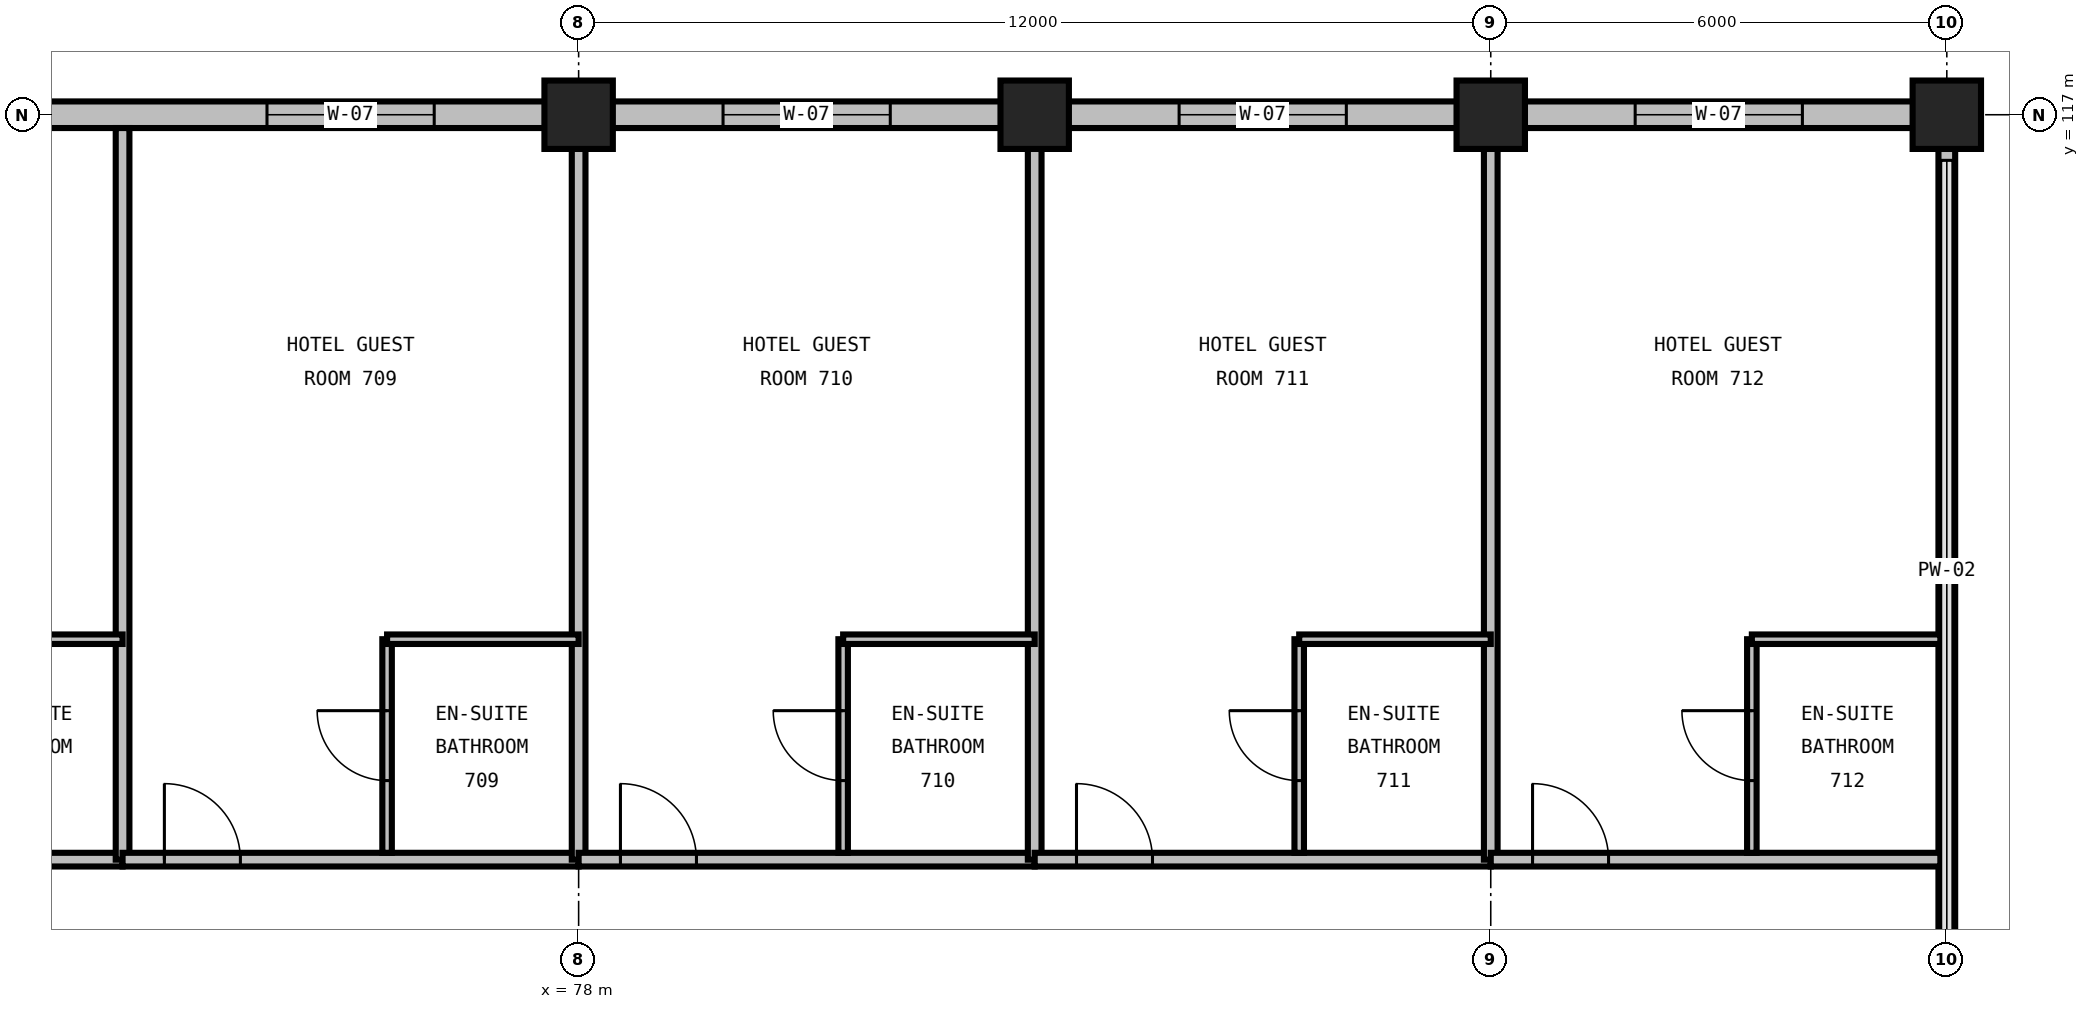
"""IFC4 building model, lengths in metres.
Left out: names, types, materials, properties, quantities, classifications, styles, units other than length and angle.
Written with IfcOpenShell. Run it as: python <this file> out.ifc"""

import sys

from ifc_helpers import new_model, si_unit, direction, frame, frame_2d, origin, origin_2d, place, context, subcontext, project, spatial, rectangle, extrude, element, fill, save


model = new_model("IFC4")
c1 = context("Model", 3, precision=1e-05, world=origin(), true_north=direction((0.0, 1.0)))
c2 = subcontext(c1, "Body", "Model", "MODEL_VIEW")
j1 = project(units=[si_unit("LENGTHUNIT", "METRE"), si_unit("PLANEANGLEUNIT", "RADIAN")], contexts=[c1])
p1 = place(None, origin())
s1 = spatial("IfcSite", under=j1, at=p1, CompositionType="ELEMENT")
p2 = place(p1, origin())
s2 = spatial("IfcBuilding", under=s1, at=p2, CompositionType="ELEMENT")
p3 = place(p2, frame((0.0, 0.0, 34.8)))
s3 = spatial("IfcBuildingStorey", under=s2, at=p3, CompositionType="ELEMENT", Elevation=34.8)
for number, where, z_axis, x_axis in (
    (1, (78.0, 117.0, 0.0), (0.0, 0.0, 1.0), (1.0, 0.0, 0.0)),
    (2, (84.0, 117.0, 0.0), (0.0, 0.0, 1.0), (1.0, 0.0, 0.0)),
    (3, (90.0, 117.0, 0.0), (0.0, 0.0, 1.0), (1.0, 0.0, 0.0)),
    (4, (96.0, 117.0, 0.0), (0.0, 0.0, 1.0), (1.0, 0.0, 0.0)),
):
    element("IfcColumn", number, at=place(p3, frame(where, z_axis=z_axis, x_axis=x_axis)), inside=s3, PredefinedType="COLUMN", context=c2, shape_type="SweptSolid", body=[
        extrude(rectangle(XDim=0.9, YDim=0.9, at=origin_2d()), origin(), (0.0, 0.0, 1.0), 3.6),
    ])
p4 = place(p3, frame((78.0, 117.0, 0.0), z_axis=(0.0, 0.0, 1.0), x_axis=(-1.0, 0.0, 0.0)))
e5 = element("IfcWall", 5, at=p4, inside=s3, PredefinedType="STANDARD", context=c2, shape_type="SweptSolid", body=[
    extrude(rectangle(XDim=12.0, YDim=0.35, at=frame_2d((6.0, 0.0))), origin(), (0.0, 0.0, 1.0), 2.486),
])
p5 = place(p4, frame((1.9, 0.0, 0.75)))
e6 = element("IfcOpeningElement", 6, at=p5, cuts=e5, PredefinedType="OPENING", context=c2, shape_type="SweptSolid", body=[
    extrude(rectangle(XDim=2.2, YDim=1.6, at=frame_2d((1.1, 0.8))), frame((0.0, 0.19, 0.0), z_axis=(0.0, -1.0, 0.0), x_axis=(1.0, 0.0, 0.0)), (0.0, 0.0, 1.0), 0.38),
])
p6 = place(p4, frame((7.825, 0.0, 0.75)))
e7 = element("IfcOpeningElement", 7, at=p6, cuts=e5, PredefinedType="OPENING", context=c2, shape_type="SweptSolid", body=[
    extrude(rectangle(XDim=2.35, YDim=1.6, at=frame_2d((1.175, 0.8))), frame((0.0, 0.19, 0.0), z_axis=(0.0, -1.0, 0.0), x_axis=(1.0, 0.0, 0.0)), (0.0, 0.0, 1.0), 0.38),
])
p7 = place(p3, frame((84.0, 117.0, 0.0), z_axis=(0.0, 0.0, 1.0), x_axis=(-1.0, 0.0, 0.0)))
e8 = element("IfcWall", 8, at=p7, inside=s3, PredefinedType="STANDARD", context=c2, shape_type="SweptSolid", body=[
    extrude(rectangle(XDim=6.0, YDim=0.35, at=frame_2d((3.0, 0.0))), origin(), (0.0, 0.0, 1.0), 2.486),
])
p8 = place(p7, frame((1.9, 0.0, 0.75)))
e9 = element("IfcOpeningElement", 9, at=p8, cuts=e8, PredefinedType="OPENING", context=c2, shape_type="SweptSolid", body=[
    extrude(rectangle(XDim=2.2, YDim=1.6, at=frame_2d((1.1, 0.8))), frame((0.0, 0.19, 0.0), z_axis=(0.0, -1.0, 0.0), x_axis=(1.0, 0.0, 0.0)), (0.0, 0.0, 1.0), 0.38),
])
p9 = place(p3, frame((90.0, 117.0, 0.0), z_axis=(0.0, 0.0, 1.0), x_axis=(-1.0, 0.0, 0.0)))
e10 = element("IfcWall", 10, at=p9, inside=s3, PredefinedType="STANDARD", context=c2, shape_type="SweptSolid", body=[
    extrude(rectangle(XDim=6.0, YDim=0.35, at=frame_2d((3.0, 0.0))), origin(), (0.0, 0.0, 1.0), 2.486),
])
p10 = place(p9, frame((1.9, 0.0, 0.75)))
e11 = element("IfcOpeningElement", 11, at=p10, cuts=e10, PredefinedType="OPENING", context=c2, shape_type="SweptSolid", body=[
    extrude(rectangle(XDim=2.2, YDim=1.6, at=frame_2d((1.1, 0.8))), frame((0.0, 0.19, 0.0), z_axis=(0.0, -1.0, 0.0), x_axis=(1.0, 0.0, 0.0)), (0.0, 0.0, 1.0), 0.38),
])
p11 = place(p3, frame((96.0, 117.0, 0.0), z_axis=(0.0, 0.0, 1.0), x_axis=(-1.0, 0.0, 0.0)))
e12 = element("IfcWall", 12, at=p11, inside=s3, PredefinedType="STANDARD", context=c2, shape_type="SweptSolid", body=[
    extrude(rectangle(XDim=6.0, YDim=0.35, at=frame_2d((3.0, 0.0))), origin(), (0.0, 0.0, 1.0), 2.486),
])
p12 = place(p11, frame((1.9, 0.0, 0.75)))
e13 = element("IfcOpeningElement", 13, at=p12, cuts=e12, PredefinedType="OPENING", context=c2, shape_type="SweptSolid", body=[
    extrude(rectangle(XDim=2.2, YDim=1.6, at=frame_2d((1.1, 0.8))), frame((0.0, 0.19, 0.0), z_axis=(0.0, -1.0, 0.0), x_axis=(1.0, 0.0, 0.0)), (0.0, 0.0, 1.0), 0.38),
])
p13 = place(p3, frame((96.0, 105.0, 0.0), z_axis=(0.0, 0.0, 1.0), x_axis=(0.0, 1.0, 0.0)))
e14 = element("IfcWall", 14, at=p13, inside=s3, PredefinedType="PARAPET", context=c2, shape_type="SweptSolid", body=[
    extrude(rectangle(XDim=12.0, YDim=0.22, at=frame_2d((6.0, 0.0))), origin(), (0.0, 0.0, 1.0), 0.2),
])
p14 = place(p3, frame((66.0, 107.2, 0.0), z_axis=(0.0, 0.0, 1.0), x_axis=(1.0, 0.0, 0.0)))
e15 = element("IfcWall", 15, at=p14, inside=s3, PredefinedType="PARTITIONING", context=c2, shape_type="SweptSolid", body=[
    extrude(rectangle(XDim=6.0, YDim=0.18, at=frame_2d((3.0, 0.0))), origin(), (0.0, 0.0, 1.0), 3.29),
])
p15 = place(p14, frame((0.55, 0.0, 0.0)))
e16 = element("IfcOpeningElement", 16, at=p15, cuts=e15, PredefinedType="OPENING", context=c2, shape_type="SweptSolid", body=[
    extrude(rectangle(XDim=1.0, YDim=2.15, at=frame_2d((0.5, 1.075))), frame((0.0, 0.105, 0.0), z_axis=(0.0, -1.0, 0.0), x_axis=(1.0, 0.0, 0.0)), (0.0, 0.0, 1.0), 0.21),
])
p16 = place(p3, frame((72.0, 107.2, 0.0), z_axis=(0.0, 0.0, 1.0), x_axis=(0.0, 1.0, 0.0)))
e17 = element("IfcWall", 17, at=p16, inside=s3, PredefinedType="PARTITIONING", context=c2, shape_type="SweptSolid", body=[
    extrude(rectangle(XDim=9.625, YDim=0.18, at=frame_2d((4.812, 0.0))), origin(), (0.0, 0.0, 1.0), 3.29),
])
p17 = place(p3, frame((69.48, 110.1, 0.0), z_axis=(0.0, 0.0, 1.0), x_axis=(1.0, 0.0, 0.0)))
e18 = element("IfcWall", 18, at=p17, inside=s3, PredefinedType="PARTITIONING", context=c2, shape_type="SweptSolid", body=[
    extrude(rectangle(XDim=2.52, YDim=0.125, at=frame_2d((1.26, 0.0))), origin(), (0.0, 0.0, 1.0), 3.29),
])
p18 = place(p3, frame((72.0, 107.2, 0.0), z_axis=(0.0, 0.0, 1.0), x_axis=(1.0, 0.0, 0.0)))
e19 = element("IfcWall", 19, at=p18, inside=s3, PredefinedType="PARTITIONING", context=c2, shape_type="SweptSolid", body=[
    extrude(rectangle(XDim=6.0, YDim=0.18, at=frame_2d((3.0, 0.0))), origin(), (0.0, 0.0, 1.0), 3.29),
])
p19 = place(p18, frame((0.55, 0.0, 0.0)))
e20 = element("IfcOpeningElement", 20, at=p19, cuts=e19, PredefinedType="OPENING", context=c2, shape_type="SweptSolid", body=[
    extrude(rectangle(XDim=1.0, YDim=2.15, at=frame_2d((0.5, 1.075))), frame((0.0, 0.105, 0.0), z_axis=(0.0, -1.0, 0.0), x_axis=(1.0, 0.0, 0.0)), (0.0, 0.0, 1.0), 0.21),
])
p20 = place(p3, frame((78.0, 107.2, 0.0), z_axis=(0.0, 0.0, 1.0), x_axis=(0.0, 1.0, 0.0)))
e21 = element("IfcWall", 21, at=p20, inside=s3, PredefinedType="PARTITIONING", context=c2, shape_type="SweptSolid", body=[
    extrude(rectangle(XDim=9.625, YDim=0.18, at=frame_2d((4.812, 0.0))), origin(), (0.0, 0.0, 1.0), 2.59),
])
p21 = place(p3, frame((75.48, 107.29, 0.0), z_axis=(0.0, 0.0, 1.0), x_axis=(0.0, 1.0, 0.0)))
e22 = element("IfcWall", 22, at=p21, inside=s3, PredefinedType="PARTITIONING", context=c2, shape_type="SweptSolid", body=[
    extrude(rectangle(XDim=2.81, YDim=0.125, at=frame_2d((1.405, 0.0))), origin(), (0.0, 0.0, 1.0), 3.29),
])
p22 = place(p21, frame((0.95, 0.0, 0.0)))
e23 = element("IfcOpeningElement", 23, at=p22, cuts=e22, PredefinedType="OPENING", context=c2, shape_type="SweptSolid", body=[
    extrude(rectangle(XDim=0.92, YDim=2.1, at=frame_2d((0.46, 1.05))), frame((0.0, 0.077, 0.0), z_axis=(0.0, -1.0, 0.0), x_axis=(1.0, 0.0, 0.0)), (0.0, 0.0, 1.0), 0.155),
])
p23 = place(p3, frame((75.48, 110.1, 0.0), z_axis=(0.0, 0.0, 1.0), x_axis=(1.0, 0.0, 0.0)))
e24 = element("IfcWall", 24, at=p23, inside=s3, PredefinedType="PARTITIONING", context=c2, shape_type="SweptSolid", body=[
    extrude(rectangle(XDim=2.52, YDim=0.125, at=frame_2d((1.26, 0.0))), origin(), (0.0, 0.0, 1.0), 3.29),
])
p24 = place(p3, frame((78.0, 107.2, 0.0), z_axis=(0.0, 0.0, 1.0), x_axis=(1.0, 0.0, 0.0)))
e25 = element("IfcWall", 25, at=p24, inside=s3, PredefinedType="PARTITIONING", context=c2, shape_type="SweptSolid", body=[
    extrude(rectangle(XDim=6.0, YDim=0.18, at=frame_2d((3.0, 0.0))), origin(), (0.0, 0.0, 1.0), 3.29),
])
p25 = place(p24, frame((0.55, 0.0, 0.0)))
e26 = element("IfcOpeningElement", 26, at=p25, cuts=e25, PredefinedType="OPENING", context=c2, shape_type="SweptSolid", body=[
    extrude(rectangle(XDim=1.0, YDim=2.15, at=frame_2d((0.5, 1.075))), frame((0.0, 0.105, 0.0), z_axis=(0.0, -1.0, 0.0), x_axis=(1.0, 0.0, 0.0)), (0.0, 0.0, 1.0), 0.21),
])
p26 = place(p3, frame((84.0, 107.2, 0.0), z_axis=(0.0, 0.0, 1.0), x_axis=(0.0, 1.0, 0.0)))
e27 = element("IfcWall", 27, at=p26, inside=s3, PredefinedType="PARTITIONING", context=c2, shape_type="SweptSolid", body=[
    extrude(rectangle(XDim=9.625, YDim=0.18, at=frame_2d((4.812, 0.0))), origin(), (0.0, 0.0, 1.0), 2.59),
])
p27 = place(p3, frame((81.48, 107.29, 0.0), z_axis=(0.0, 0.0, 1.0), x_axis=(0.0, 1.0, 0.0)))
e28 = element("IfcWall", 28, at=p27, inside=s3, PredefinedType="PARTITIONING", context=c2, shape_type="SweptSolid", body=[
    extrude(rectangle(XDim=2.81, YDim=0.125, at=frame_2d((1.405, 0.0))), origin(), (0.0, 0.0, 1.0), 3.29),
])
p28 = place(p27, frame((0.95, 0.0, 0.0)))
e29 = element("IfcOpeningElement", 29, at=p28, cuts=e28, PredefinedType="OPENING", context=c2, shape_type="SweptSolid", body=[
    extrude(rectangle(XDim=0.92, YDim=2.1, at=frame_2d((0.46, 1.05))), frame((0.0, 0.077, 0.0), z_axis=(0.0, -1.0, 0.0), x_axis=(1.0, 0.0, 0.0)), (0.0, 0.0, 1.0), 0.155),
])
p29 = place(p3, frame((81.48, 110.1, 0.0), z_axis=(0.0, 0.0, 1.0), x_axis=(1.0, 0.0, 0.0)))
e30 = element("IfcWall", 30, at=p29, inside=s3, PredefinedType="PARTITIONING", context=c2, shape_type="SweptSolid", body=[
    extrude(rectangle(XDim=2.52, YDim=0.125, at=frame_2d((1.26, 0.0))), origin(), (0.0, 0.0, 1.0), 3.29),
])
p30 = place(p3, frame((84.0, 107.2, 0.0), z_axis=(0.0, 0.0, 1.0), x_axis=(1.0, 0.0, 0.0)))
e31 = element("IfcWall", 31, at=p30, inside=s3, PredefinedType="PARTITIONING", context=c2, shape_type="SweptSolid", body=[
    extrude(rectangle(XDim=6.0, YDim=0.18, at=frame_2d((3.0, 0.0))), origin(), (0.0, 0.0, 1.0), 3.29),
])
p31 = place(p30, frame((0.55, 0.0, 0.0)))
e32 = element("IfcOpeningElement", 32, at=p31, cuts=e31, PredefinedType="OPENING", context=c2, shape_type="SweptSolid", body=[
    extrude(rectangle(XDim=1.0, YDim=2.15, at=frame_2d((0.5, 1.075))), frame((0.0, 0.105, 0.0), z_axis=(0.0, -1.0, 0.0), x_axis=(1.0, 0.0, 0.0)), (0.0, 0.0, 1.0), 0.21),
])
p32 = place(p3, frame((90.0, 107.2, 0.0), z_axis=(0.0, 0.0, 1.0), x_axis=(0.0, 1.0, 0.0)))
e33 = element("IfcWall", 33, at=p32, inside=s3, PredefinedType="PARTITIONING", context=c2, shape_type="SweptSolid", body=[
    extrude(rectangle(XDim=9.625, YDim=0.18, at=frame_2d((4.812, 0.0))), origin(), (0.0, 0.0, 1.0), 2.59),
])
p33 = place(p3, frame((87.48, 107.29, 0.0), z_axis=(0.0, 0.0, 1.0), x_axis=(0.0, 1.0, 0.0)))
e34 = element("IfcWall", 34, at=p33, inside=s3, PredefinedType="PARTITIONING", context=c2, shape_type="SweptSolid", body=[
    extrude(rectangle(XDim=2.81, YDim=0.125, at=frame_2d((1.405, 0.0))), origin(), (0.0, 0.0, 1.0), 3.29),
])
p34 = place(p33, frame((0.95, 0.0, 0.0)))
e35 = element("IfcOpeningElement", 35, at=p34, cuts=e34, PredefinedType="OPENING", context=c2, shape_type="SweptSolid", body=[
    extrude(rectangle(XDim=0.92, YDim=2.1, at=frame_2d((0.46, 1.05))), frame((0.0, 0.077, 0.0), z_axis=(0.0, -1.0, 0.0), x_axis=(1.0, 0.0, 0.0)), (0.0, 0.0, 1.0), 0.155),
])
p35 = place(p3, frame((87.48, 110.1, 0.0), z_axis=(0.0, 0.0, 1.0), x_axis=(1.0, 0.0, 0.0)))
e36 = element("IfcWall", 36, at=p35, inside=s3, PredefinedType="PARTITIONING", context=c2, shape_type="SweptSolid", body=[
    extrude(rectangle(XDim=2.52, YDim=0.125, at=frame_2d((1.26, 0.0))), origin(), (0.0, 0.0, 1.0), 3.29),
])
p36 = place(p3, frame((90.0, 107.2, 0.0), z_axis=(0.0, 0.0, 1.0), x_axis=(1.0, 0.0, 0.0)))
e37 = element("IfcWall", 37, at=p36, inside=s3, PredefinedType="PARTITIONING", context=c2, shape_type="SweptSolid", body=[
    extrude(rectangle(XDim=5.915, YDim=0.18, at=frame_2d((2.957, 0.0))), origin(), (0.0, 0.0, 1.0), 3.29),
])
p37 = place(p36, frame((0.55, 0.0, 0.0)))
e38 = element("IfcOpeningElement", 38, at=p37, cuts=e37, PredefinedType="OPENING", context=c2, shape_type="SweptSolid", body=[
    extrude(rectangle(XDim=1.0, YDim=2.15, at=frame_2d((0.5, 1.075))), frame((0.0, 0.105, 0.0), z_axis=(0.0, -1.0, 0.0), x_axis=(1.0, 0.0, 0.0)), (0.0, 0.0, 1.0), 0.21),
])
p38 = place(p3, frame((93.435, 107.29, 0.0), z_axis=(0.0, 0.0, 1.0), x_axis=(0.0, 1.0, 0.0)))
e39 = element("IfcWall", 39, at=p38, inside=s3, PredefinedType="PARTITIONING", context=c2, shape_type="SweptSolid", body=[
    extrude(rectangle(XDim=2.81, YDim=0.125, at=frame_2d((1.405, 0.0))), origin(), (0.0, 0.0, 1.0), 3.29),
])
p39 = place(p38, frame((0.95, 0.0, 0.0)))
e40 = element("IfcOpeningElement", 40, at=p39, cuts=e39, PredefinedType="OPENING", context=c2, shape_type="SweptSolid", body=[
    extrude(rectangle(XDim=0.92, YDim=2.1, at=frame_2d((0.46, 1.05))), frame((0.0, 0.077, 0.0), z_axis=(0.0, -1.0, 0.0), x_axis=(1.0, 0.0, 0.0)), (0.0, 0.0, 1.0), 0.155),
])
p40 = place(p3, frame((93.435, 110.1, 0.0), z_axis=(0.0, 0.0, 1.0), x_axis=(1.0, 0.0, 0.0)))
e41 = element("IfcWall", 41, at=p40, inside=s3, PredefinedType="PARTITIONING", context=c2, shape_type="SweptSolid", body=[
    extrude(rectangle(XDim=2.48, YDim=0.125, at=frame_2d((1.24, 0.0))), origin(), (0.0, 0.0, 1.0), 3.29),
])
p41 = place(p5, origin())
e42 = element("IfcWindow", 42, at=p41, inside=s3, PartitioningType="DOUBLE_PANEL_VERTICAL", PredefinedType="WINDOW", context=c2, shape_type="SweptSolid", body=[
    extrude(rectangle(XDim=2.2, YDim=1.6, at=frame_2d((1.1, 0.8))), frame((0.0, 0.03, 0.0), z_axis=(0.0, -1.0, 0.0), x_axis=(1.0, 0.0, 0.0)), (0.0, 0.0, 1.0), 0.06),
])
fill(e6, e42)
p42 = place(p8, origin())
e43 = element("IfcWindow", 43, at=p42, inside=s3, PartitioningType="DOUBLE_PANEL_VERTICAL", PredefinedType="WINDOW", context=c2, shape_type="SweptSolid", body=[
    extrude(rectangle(XDim=2.2, YDim=1.6, at=frame_2d((1.1, 0.8))), frame((0.0, 0.03, 0.0), z_axis=(0.0, -1.0, 0.0), x_axis=(1.0, 0.0, 0.0)), (0.0, 0.0, 1.0), 0.06),
])
fill(e9, e43)
p43 = place(p10, origin())
e44 = element("IfcWindow", 44, at=p43, inside=s3, PartitioningType="DOUBLE_PANEL_VERTICAL", PredefinedType="WINDOW", context=c2, shape_type="SweptSolid", body=[
    extrude(rectangle(XDim=2.2, YDim=1.6, at=frame_2d((1.1, 0.8))), frame((0.0, 0.03, 0.0), z_axis=(0.0, -1.0, 0.0), x_axis=(1.0, 0.0, 0.0)), (0.0, 0.0, 1.0), 0.06),
])
fill(e11, e44)
p44 = place(p12, origin())
e45 = element("IfcWindow", 45, at=p44, inside=s3, PartitioningType="DOUBLE_PANEL_VERTICAL", PredefinedType="WINDOW", context=c2, shape_type="SweptSolid", body=[
    extrude(rectangle(XDim=2.2, YDim=1.6, at=frame_2d((1.1, 0.8))), frame((0.0, 0.03, 0.0), z_axis=(0.0, -1.0, 0.0), x_axis=(1.0, 0.0, 0.0)), (0.0, 0.0, 1.0), 0.06),
])
fill(e13, e45)
p45 = place(p19, origin())
e46 = element("IfcDoor", 46, at=p45, inside=s3, OperationType="SINGLE_SWING_LEFT", PredefinedType="DOOR", context=c2, shape_type="SweptSolid", body=[
    extrude(rectangle(XDim=1.0, YDim=2.15, at=frame_2d((0.5, 1.075))), frame((0.0, 0.025, 0.0), z_axis=(0.0, -1.0, 0.0), x_axis=(1.0, 0.0, 0.0)), (0.0, 0.0, 1.0), 0.05),
])
fill(e20, e46)
p46 = place(p22, origin())
e47 = element("IfcDoor", 47, at=p46, inside=s3, OperationType="SINGLE_SWING_RIGHT", PredefinedType="DOOR", context=c2, shape_type="SweptSolid", body=[
    extrude(rectangle(XDim=0.92, YDim=2.1, at=frame_2d((0.46, 1.05))), frame((0.0, 0.025, 0.0), z_axis=(0.0, -1.0, 0.0), x_axis=(1.0, 0.0, 0.0)), (0.0, 0.0, 1.0), 0.05),
])
fill(e23, e47)
p47 = place(p25, origin())
e48 = element("IfcDoor", 48, at=p47, inside=s3, OperationType="SINGLE_SWING_LEFT", PredefinedType="DOOR", context=c2, shape_type="SweptSolid", body=[
    extrude(rectangle(XDim=1.0, YDim=2.15, at=frame_2d((0.5, 1.075))), frame((0.0, 0.025, 0.0), z_axis=(0.0, -1.0, 0.0), x_axis=(1.0, 0.0, 0.0)), (0.0, 0.0, 1.0), 0.05),
])
fill(e26, e48)
p48 = place(p28, origin())
e49 = element("IfcDoor", 49, at=p48, inside=s3, OperationType="SINGLE_SWING_RIGHT", PredefinedType="DOOR", context=c2, shape_type="SweptSolid", body=[
    extrude(rectangle(XDim=0.92, YDim=2.1, at=frame_2d((0.46, 1.05))), frame((0.0, 0.025, 0.0), z_axis=(0.0, -1.0, 0.0), x_axis=(1.0, 0.0, 0.0)), (0.0, 0.0, 1.0), 0.05),
])
fill(e29, e49)
p49 = place(p31, origin())
e50 = element("IfcDoor", 50, at=p49, inside=s3, OperationType="SINGLE_SWING_LEFT", PredefinedType="DOOR", context=c2, shape_type="SweptSolid", body=[
    extrude(rectangle(XDim=1.0, YDim=2.15, at=frame_2d((0.5, 1.075))), frame((0.0, 0.025, 0.0), z_axis=(0.0, -1.0, 0.0), x_axis=(1.0, 0.0, 0.0)), (0.0, 0.0, 1.0), 0.05),
])
fill(e32, e50)
p50 = place(p34, origin())
e51 = element("IfcDoor", 51, at=p50, inside=s3, OperationType="SINGLE_SWING_RIGHT", PredefinedType="DOOR", context=c2, shape_type="SweptSolid", body=[
    extrude(rectangle(XDim=0.92, YDim=2.1, at=frame_2d((0.46, 1.05))), frame((0.0, 0.025, 0.0), z_axis=(0.0, -1.0, 0.0), x_axis=(1.0, 0.0, 0.0)), (0.0, 0.0, 1.0), 0.05),
])
fill(e35, e51)
p51 = place(p37, origin())
e52 = element("IfcDoor", 52, at=p51, inside=s3, OperationType="SINGLE_SWING_LEFT", PredefinedType="DOOR", context=c2, shape_type="SweptSolid", body=[
    extrude(rectangle(XDim=1.0, YDim=2.15, at=frame_2d((0.5, 1.075))), frame((0.0, 0.025, 0.0), z_axis=(0.0, -1.0, 0.0), x_axis=(1.0, 0.0, 0.0)), (0.0, 0.0, 1.0), 0.05),
])
fill(e38, e52)
p52 = place(p39, origin())
e53 = element("IfcDoor", 53, at=p52, inside=s3, OperationType="SINGLE_SWING_RIGHT", PredefinedType="DOOR", context=c2, shape_type="SweptSolid", body=[
    extrude(rectangle(XDim=0.92, YDim=2.1, at=frame_2d((0.46, 1.05))), frame((0.0, 0.025, 0.0), z_axis=(0.0, -1.0, 0.0), x_axis=(1.0, 0.0, 0.0)), (0.0, 0.0, 1.0), 0.05),
])
fill(e40, e53)
save(model, sys.argv[1])
